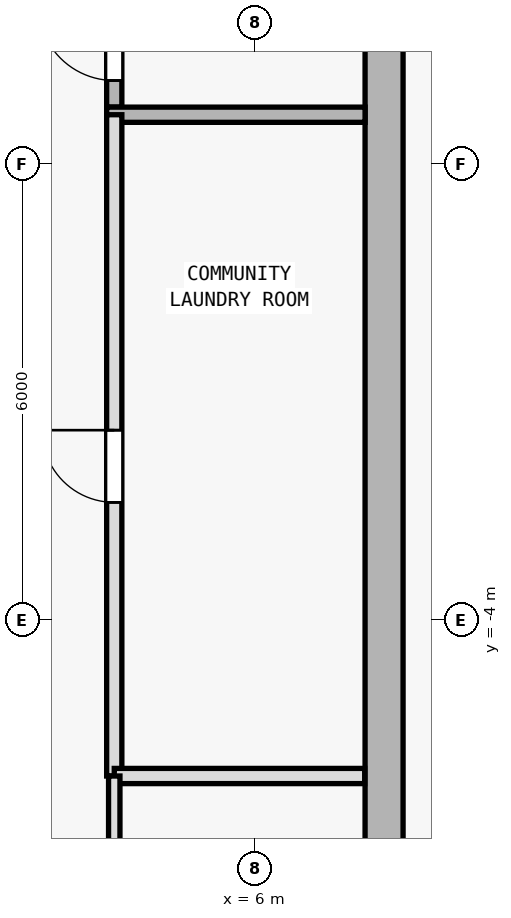
"""IFC4 building model, lengths in metres.
Left out: names, types, materials, properties, quantities, classifications, styles, units other than length and angle.
Written with IfcOpenShell. Run it as: python <this file> out.ifc"""

import sys

from ifc_helpers import new_model, si_unit, direction, frame, frame_2d, origin, origin_2d, place, context, subcontext, project, spatial, rectangle, i_section, extrude, element, fill, save


model = new_model("IFC4")
c1 = context("Model", 3, precision=1e-05, world=origin(), true_north=direction((0.0, 1.0)))
c2 = subcontext(c1, "Body", "Model", "MODEL_VIEW")
j1 = project(units=[si_unit("LENGTHUNIT", "METRE"), si_unit("PLANEANGLEUNIT", "RADIAN")], contexts=[c1])
p1 = place(None, origin())
s1 = spatial("IfcSite", under=j1, at=p1, CompositionType="ELEMENT")
p2 = place(p1, origin())
s2 = spatial("IfcBuilding", under=s1, at=p2, CompositionType="ELEMENT")
p3 = place(p2, frame((0.0, 0.0, 156.6)))
s3 = spatial("IfcBuildingStorey", under=s2, at=p3, CompositionType="ELEMENT", Elevation=156.6)
p4 = place(p3, frame((7.7, 0.4, 0.0), z_axis=(0.0, 0.0, 1.0), x_axis=(1.0, 0.0, 0.0)))
e1 = element("IfcColumn", 1, at=p4, inside=s3, PredefinedType="COLUMN", context=c2, shape_type="SweptSolid", body=[
    extrude(i_section(OverallWidth=0.404, OverallDepth=0.407, WebThickness=0.017, FlangeThickness=0.028, FilletRadius=0.015, at=origin_2d()), origin(), (0.0, 0.0, 1.0), 3.6),
])
p5 = place(p3, frame((7.7, 9.95, 0.0), z_axis=(0.0, 0.0, 1.0), x_axis=(0.0, -1.0, 0.0)))
e2 = element("IfcWall", 2, at=p5, inside=s3, PredefinedType="SHEAR", context=c2, shape_type="SweptSolid", body=[
    extrude(rectangle(XDim=19.1, YDim=0.5, at=frame_2d((9.55, 0.0))), origin(), (0.0, 0.0, 1.0), 3.35),
])
p6 = place(p3, frame((4.15, 2.75, 0.0), z_axis=(0.0, 0.0, 1.0), x_axis=(0.0, 1.0, 0.0)))
e3 = element("IfcWall", 3, at=p6, inside=s3, PredefinedType="SOLIDWALL", context=c2, shape_type="SweptSolid", body=[
    extrude(rectangle(XDim=7.2, YDim=0.2, at=frame_2d((3.6, 0.0))), origin(), (0.0, 0.0, 1.0), 3.35),
])
p7 = place(p6, frame((0.35, 0.0, 0.0)))
e4 = element("IfcOpeningElement", 4, at=p7, cuts=e3, PredefinedType="OPENING", context=c2, shape_type="SweptSolid", body=[
    extrude(rectangle(XDim=1.0, YDim=2.15, at=frame_2d((0.5, 1.075))), frame((0.0, 0.11, 0.0), z_axis=(0.0, -1.0, 0.0), x_axis=(1.0, 0.0, 0.0)), (0.0, 0.0, 1.0), 0.22),
])
p8 = place(p3, frame((4.05, 2.65, 0.0), z_axis=(0.0, 0.0, 1.0), x_axis=(1.0, 0.0, 0.0)))
e5 = element("IfcWall", 5, at=p8, inside=s3, PredefinedType="SOLIDWALL", context=c2, shape_type="SweptSolid", body=[
    extrude(rectangle(XDim=3.4, YDim=0.2, at=frame_2d((1.7, 0.0))), origin(), (0.0, 0.0, 1.0), 3.35),
])
p9 = place(p3, frame((4.15, -6.05, 0.0), z_axis=(0.0, 0.0, 1.0), x_axis=(0.0, 1.0, 0.0)))
e6 = element("IfcWall", 6, at=p9, inside=s3, PredefinedType="SOLIDWALL", context=c2, shape_type="SweptSolid", body=[
    extrude(rectangle(XDim=8.7, YDim=0.2, at=frame_2d((4.35, 0.0))), origin(), (0.0, 0.0, 1.0), 3.35),
])
p10 = place(p9, frame((3.6, 0.0, 0.0)))
e7 = element("IfcOpeningElement", 7, at=p10, cuts=e6, PredefinedType="OPENING", context=c2, shape_type="SweptSolid", body=[
    extrude(rectangle(XDim=0.95, YDim=2.1, at=frame_2d((0.475, 1.05))), frame((0.0, 0.11, 0.0), z_axis=(0.0, -1.0, 0.0), x_axis=(1.0, 0.0, 0.0)), (0.0, 0.0, 1.0), 0.22),
])
p11 = place(p3, frame((4.15, -6.05, 0.0), z_axis=(0.0, 0.0, 1.0), x_axis=(1.0, 0.0, 0.0)))
e8 = element("IfcWall", 8, at=p11, inside=s3, PredefinedType="SOLIDWALL", context=c2, shape_type="SweptSolid", body=[
    extrude(rectangle(XDim=3.295, YDim=0.2, at=frame_2d((1.647, 0.0))), origin(), (0.0, 0.0, 1.0), 3.35),
])
p12 = place(p3, frame((4.15, -9.145, 0.0), z_axis=(0.0, 0.0, 1.0), x_axis=(0.0, 1.0, 0.0)))
e9 = element("IfcWall", 9, at=p12, inside=s3, PredefinedType="PARTITIONING", context=c2, shape_type="SweptSolid", body=[
    extrude(rectangle(XDim=3.095, YDim=0.15, at=frame_2d((1.547, 0.0))), origin(), (0.0, 0.0, 1.0), 3.35),
])
p13 = place(p12, frame((0.845, 0.0, 0.0)))
e10 = element("IfcOpeningElement", 10, at=p13, cuts=e9, PredefinedType="OPENING", context=c2, shape_type="SweptSolid", body=[
    extrude(rectangle(XDim=0.9, YDim=2.1, at=frame_2d((0.45, 1.05))), frame((0.0, 0.085, 0.0), z_axis=(0.0, -1.0, 0.0), x_axis=(1.0, 0.0, 0.0)), (0.0, 0.0, 1.0), 0.17),
])
p14 = place(p7, origin())
e11 = element("IfcDoor", 11, at=p14, inside=s3, OperationType="SINGLE_SWING_RIGHT", PredefinedType="DOOR", context=c2, shape_type="SweptSolid", body=[
    extrude(rectangle(XDim=1.0, YDim=2.15, at=frame_2d((0.5, 1.075))), frame((0.0, 0.025, 0.0), z_axis=(0.0, -1.0, 0.0), x_axis=(1.0, 0.0, 0.0)), (0.0, 0.0, 1.0), 0.05),
])
fill(e4, e11)
p15 = place(p10, origin())
e12 = element("IfcDoor", 12, at=p15, inside=s3, OperationType="SINGLE_SWING_RIGHT", PredefinedType="DOOR", context=c2, shape_type="SweptSolid", body=[
    extrude(rectangle(XDim=0.95, YDim=2.1, at=frame_2d((0.475, 1.05))), frame((0.0, 0.025, 0.0), z_axis=(0.0, -1.0, 0.0), x_axis=(1.0, 0.0, 0.0)), (0.0, 0.0, 1.0), 0.05),
])
fill(e7, e12)
save(model, sys.argv[1])
